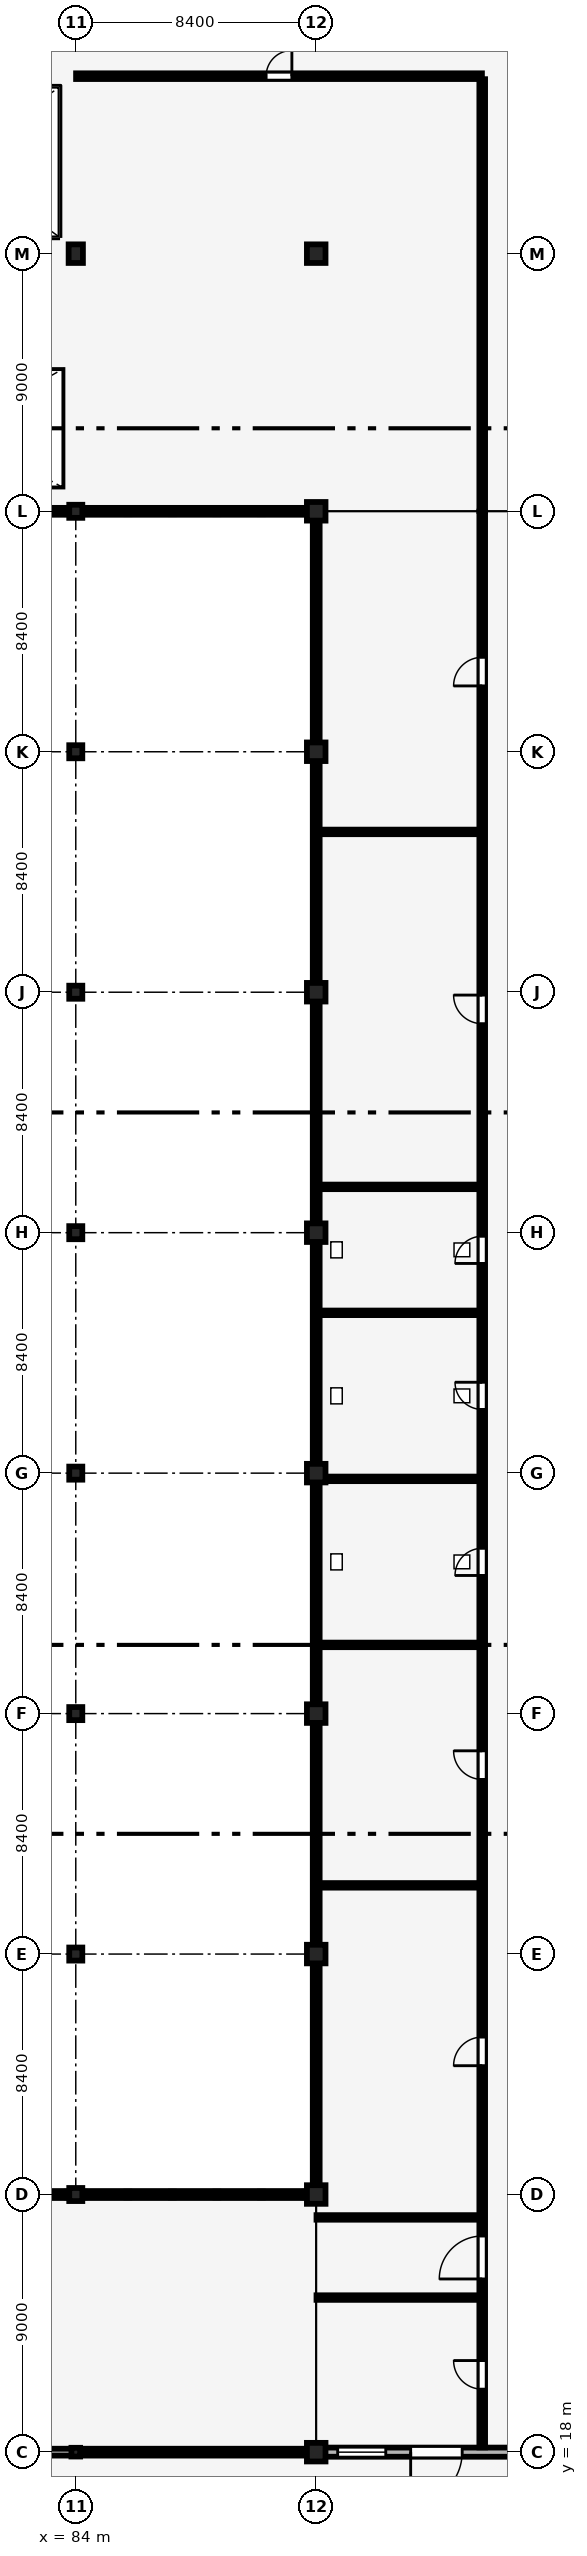
"""IFC4 building model, lengths in metres.
Left out: names, types, materials, properties, quantities, classifications, styles, units other than length and angle.
Written with IfcOpenShell. Run it as: python <this file> out.ifc"""

import sys

from ifc_helpers import new_model, si_unit, direction, frame, frame_2d, origin, origin_2d, place, context, subcontext, project, spatial, rectangle, hollow_rectangle, hollow_circle, extrude, element, fill, save


model = new_model("IFC4")
c1 = context("Model", 3, precision=1e-05, world=origin(), true_north=direction((0.0, 1.0)))
c2 = subcontext(c1, "Body", "Model", "MODEL_VIEW")
j1 = project(units=[si_unit("LENGTHUNIT", "METRE"), si_unit("PLANEANGLEUNIT", "RADIAN")], contexts=[c1])
p1 = place(None, origin())
s1 = spatial("IfcSite", under=j1, at=p1, CompositionType="ELEMENT")
p2 = place(p1, origin())
s2 = spatial("IfcBuilding", under=s1, at=p2, CompositionType="ELEMENT")
p3 = place(p2, frame((0.0, 0.0, 4.8)))
s3 = spatial("IfcBuildingStorey", under=s2, at=p3, CompositionType="ELEMENT", Elevation=4.8)
p4 = place(p3, frame((84.0, 18.0, 0.0), z_axis=(0.0, 0.0, 1.0), x_axis=(1.0, 0.0, 0.0)))
e1 = element("IfcColumn", 1, at=p4, inside=s3, PredefinedType="COLUMN", context=c2, shape_type="SweptSolid", body=[
    extrude(hollow_rectangle(XDim=0.305, YDim=0.305, WallThickness=0.012, InnerFilletRadius=0.012, OuterFilletRadius=0.024, at=origin_2d()), origin(), (0.0, 0.0, 1.0), 4.2),
])
p5 = place(p3, frame((84.0, 94.8, 0.0), z_axis=(0.0, 0.0, 1.0), x_axis=(1.0, 0.0, 0.0)))
e2 = element("IfcColumn", 2, at=p5, inside=s3, PredefinedType="COLUMN", context=c2, shape_type="SweptSolid", body=[
    extrude(rectangle(XDim=0.5, YDim=0.65, at=origin_2d()), origin(), (0.0, 0.0, 1.0), 4.2),
])
for number, where, z_axis, x_axis in (
    (3, (92.4, 18.0, 0.0), (0.0, 0.0, 1.0), (1.0, 0.0, 0.0)),
    (4, (92.4, 27.0, 0.0), (0.0, 0.0, 1.0), (1.0, 0.0, 0.0)),
    (5, (92.4, 35.4, 0.0), (0.0, 0.0, 1.0), (1.0, 0.0, 0.0)),
    (6, (92.4, 43.8, 0.0), (0.0, 0.0, 1.0), (1.0, 0.0, 0.0)),
    (7, (92.4, 52.2, 0.0), (0.0, 0.0, 1.0), (1.0, 0.0, 0.0)),
    (8, (92.4, 60.6, 0.0), (0.0, 0.0, 1.0), (1.0, 0.0, 0.0)),
    (9, (92.4, 69.0, 0.0), (0.0, 0.0, 1.0), (1.0, 0.0, 0.0)),
    (10, (92.4, 77.4, 0.0), (0.0, 0.0, 1.0), (1.0, 0.0, 0.0)),
    (11, (92.4, 85.8, 0.0), (0.0, 0.0, 1.0), (1.0, 0.0, 0.0)),
    (12, (92.4, 94.8, 0.0), (0.0, 0.0, 1.0), (1.0, 0.0, 0.0)),
):
    element("IfcColumn", number, at=place(p3, frame(where, z_axis=z_axis, x_axis=x_axis)), inside=s3, PredefinedType="COLUMN", context=c2, shape_type="SweptSolid", body=[
        extrude(rectangle(XDim=0.65, YDim=0.65, at=origin_2d()), origin(), (0.0, 0.0, 1.0), 4.2),
    ])
for number, where, z_axis, x_axis in (
    (13, (84.0, 27.0, 0.0), (0.0, 0.0, 1.0), (1.0, 0.0, 0.0)),
    (14, (84.0, 35.4, 0.0), (0.0, 0.0, 1.0), (1.0, 0.0, 0.0)),
    (15, (84.0, 43.8, 0.0), (0.0, 0.0, 1.0), (1.0, 0.0, 0.0)),
    (16, (84.0, 52.2, 0.0), (0.0, 0.0, 1.0), (1.0, 0.0, 0.0)),
    (17, (84.0, 60.6, 0.0), (0.0, 0.0, 1.0), (1.0, 0.0, 0.0)),
    (18, (84.0, 69.0, 0.0), (0.0, 0.0, 1.0), (1.0, 0.0, 0.0)),
    (19, (84.0, 77.4, 0.0), (0.0, 0.0, 1.0), (1.0, 0.0, 0.0)),
    (20, (84.0, 85.8, 0.0), (0.0, 0.0, 1.0), (1.0, 0.0, 0.0)),
):
    element("IfcColumn", number, at=place(p3, frame(where, z_axis=z_axis, x_axis=x_axis)), inside=s3, PredefinedType="USERDEFINED", context=c2, shape_type="SweptSolid", body=[
        extrude(hollow_circle(Radius=0.229, WallThickness=0.013, at=origin_2d()), origin(), (0.0, 0.0, 1.0), 4.2),
    ])
p6 = place(p3, frame((92.7, 18.0, 0.0), z_axis=(0.0, 0.0, 1.0), x_axis=(1.0, 0.0, 0.0)))
e21 = element("IfcWall", 21, at=p6, inside=s3, PredefinedType="SOLIDWALL", context=c2, shape_type="SweptSolid", body=[
    extrude(rectangle(XDim=7.8, YDim=0.32, at=frame_2d((3.9, 0.0))), origin(), (0.0, 0.0, 1.0), 3.15),
])
p7 = place(p6, frame((4.8, 0.0, 0.0), z_axis=(0.0, 0.0, 1.0), x_axis=(-1.0, 0.0, 0.0)))
e22 = element("IfcOpeningElement", 22, at=p7, cuts=e21, PredefinedType="OPENING", context=c2, shape_type="SweptSolid", body=[
    extrude(rectangle(XDim=1.8, YDim=2.3, at=frame_2d((0.9, 1.15))), frame((0.0, 0.17, 0.0), z_axis=(0.0, -1.0, 0.0), x_axis=(1.0, 0.0, 0.0)), (0.0, 0.0, 1.0), 0.34),
])
p8 = place(p6, frame((0.45, 0.0, 0.95)))
e23 = element("IfcOpeningElement", 23, at=p8, cuts=e21, PredefinedType="OPENING", context=c2, shape_type="SweptSolid", body=[
    extrude(rectangle(XDim=1.68, YDim=1.8, at=frame_2d((0.84, 0.9))), frame((0.0, 0.17, 0.0), z_axis=(0.0, -1.0, 0.0), x_axis=(1.0, 0.0, 0.0)), (0.0, 0.0, 1.0), 0.34),
])
p9 = place(p3, frame((75.727, 18.0, 0.0), z_axis=(0.0, 0.0, 1.0), x_axis=(1.0, 0.0, 0.0)))
e24 = element("IfcWall", 24, at=p9, inside=s3, PredefinedType="SOLIDWALL", context=c2, shape_type="SweptSolid", body=[
    extrude(rectangle(XDim=8.145, YDim=0.24, at=frame_2d((4.073, 0.0))), origin(), (0.0, 0.0, 1.0), 3.296),
])
p10 = place(p9, frame((4.973, 0.0, 0.0), z_axis=(0.0, 0.0, 1.0), x_axis=(-1.0, 0.0, 0.0)))
e25 = element("IfcOpeningElement", 25, at=p10, cuts=e24, PredefinedType="OPENING", context=c2, shape_type="SweptSolid", body=[
    extrude(rectangle(XDim=1.8, YDim=2.3, at=frame_2d((0.9, 1.15))), frame((0.0, 0.13, 0.0), z_axis=(0.0, -1.0, 0.0), x_axis=(1.0, 0.0, 0.0)), (0.0, 0.0, 1.0), 0.26),
])
p11 = place(p9, frame((0.45, 0.0, 0.95)))
e26 = element("IfcOpeningElement", 26, at=p11, cuts=e24, PredefinedType="OPENING", context=c2, shape_type="SweptSolid", body=[
    extrude(rectangle(XDim=1.68, YDim=1.8, at=frame_2d((0.84, 0.9))), frame((0.0, 0.13, 0.0), z_axis=(0.0, -1.0, 0.0), x_axis=(1.0, 0.0, 0.0)), (0.0, 0.0, 1.0), 0.26),
])
p12 = place(p3, frame((84.127, 18.0, 0.0), z_axis=(0.0, 0.0, 1.0), x_axis=(1.0, 0.0, 0.0)))
e27 = element("IfcWall", 27, at=p12, inside=s3, PredefinedType="SOLIDWALL", context=c2, shape_type="SweptSolid", body=[
    extrude(rectangle(XDim=7.973, YDim=0.24, at=frame_2d((3.986, 0.0))), origin(), (0.0, 0.0, 1.0), 1.1),
])
p13 = place(p3, frame((75.804, 85.8, 0.0), z_axis=(0.0, 0.0, 1.0), x_axis=(1.0, 0.0, 0.0)))
e28 = element("IfcWall", 28, at=p13, inside=s3, PredefinedType="SOLIDWALL", context=c2, shape_type="SweptSolid", body=[
    extrude(rectangle(XDim=7.993, YDim=0.24, at=frame_2d((3.996, 0.0))), origin(), (0.0, 0.0, 1.0), 1.1),
])
p14 = place(p3, frame((84.204, 85.8, 0.0), z_axis=(0.0, 0.0, 1.0), x_axis=(1.0, 0.0, 0.0)))
e29 = element("IfcWall", 29, at=p14, inside=s3, PredefinedType="SOLIDWALL", context=c2, shape_type="SweptSolid", body=[
    extrude(rectangle(XDim=7.896, YDim=0.24, at=frame_2d((3.948, 0.0))), origin(), (0.0, 0.0, 1.0), 1.1),
])
for number, where, z_axis, x_axis in (
    (30, (92.4, 27.3, 0.0), (0.0, 0.0, 1.0), (0.0, 1.0, 0.0)),
    (31, (92.4, 35.7, 0.0), (0.0, 0.0, 1.0), (0.0, 1.0, 0.0)),
):
    element("IfcWall", number, at=place(p3, frame(where, z_axis=z_axis, x_axis=x_axis)), inside=s3, PredefinedType="SOLIDWALL", context=c2, shape_type="SweptSolid", body=[
        extrude(rectangle(XDim=7.8, YDim=0.24, at=frame_2d((3.9, 0.0))), origin(), (0.0, 0.0, 1.0), 1.15),
    ])
p15 = place(p3, frame((92.4, 44.1, 0.0), z_axis=(0.0, 0.0, 1.0), x_axis=(0.0, 1.0, 0.0)))
e32 = element("IfcWall", 32, at=p15, inside=s3, PredefinedType="SOLIDWALL", context=c2, shape_type="SweptSolid", body=[
    extrude(rectangle(XDim=7.8, YDim=0.24, at=frame_2d((3.9, 0.0))), origin(), (0.0, 0.0, 1.0), 1.15),
])
for number, where, z_axis, x_axis in (
    (33, (92.4, 52.5, 0.0), (0.0, 0.0, 1.0), (0.0, 1.0, 0.0)),
    (34, (92.4, 60.9, 0.0), (0.0, 0.0, 1.0), (0.0, 1.0, 0.0)),
    (35, (92.4, 69.3, 0.0), (0.0, 0.0, 1.0), (0.0, 1.0, 0.0)),
    (36, (92.4, 77.7, 0.0), (0.0, 0.0, 1.0), (0.0, 1.0, 0.0)),
):
    element("IfcWall", number, at=place(p3, frame(where, z_axis=z_axis, x_axis=x_axis)), inside=s3, PredefinedType="SOLIDWALL", context=c2, shape_type="SweptSolid", body=[
        extrude(rectangle(XDim=7.8, YDim=0.24, at=frame_2d((3.9, 0.0))), origin(), (0.0, 0.0, 1.0), 1.15),
    ])
p16 = place(p3, frame((75.804, 27.0, 0.0), z_axis=(0.0, 0.0, 1.0), x_axis=(1.0, 0.0, 0.0)))
e37 = element("IfcWall", 37, at=p16, inside=s3, PredefinedType="SOLIDWALL", context=c2, shape_type="SweptSolid", body=[
    extrude(rectangle(XDim=7.993, YDim=0.24, at=frame_2d((3.996, 0.0))), origin(), (0.0, 0.0, 1.0), 1.1),
])
p17 = place(p3, frame((84.204, 27.0, 0.0), z_axis=(0.0, 0.0, 1.0), x_axis=(1.0, 0.0, 0.0)))
e38 = element("IfcWall", 38, at=p17, inside=s3, PredefinedType="SOLIDWALL", context=c2, shape_type="SweptSolid", body=[
    extrude(rectangle(XDim=7.896, YDim=0.24, at=frame_2d((3.948, 0.0))), origin(), (0.0, 0.0, 1.0), 1.1),
])
p18 = place(p3, frame((84.01, 101.0, 0.0), z_axis=(0.0, 0.0, 1.0), x_axis=(1.0, 0.0, 0.0)))
e39 = element("IfcWall", 39, at=p18, inside=s3, PredefinedType="PARTITIONING", context=c2, shape_type="SweptSolid", body=[
    extrude(rectangle(XDim=14.18, YDim=0.2, at=frame_2d((7.09, 0.0))), origin(), (0.0, 0.0, 1.0), 3.44),
])
p19 = place(p18, frame((6.64, 0.0, 0.0)))
e40 = element("IfcOpeningElement", 40, at=p19, cuts=e39, PredefinedType="OPENING", context=c2, shape_type="SweptSolid", body=[
    extrude(rectangle(XDim=0.9, YDim=2.1, at=frame_2d((0.45, 1.05))), frame((0.0, 0.11, 0.0), z_axis=(0.0, -1.0, 0.0), x_axis=(1.0, 0.0, 0.0)), (0.0, 0.0, 1.0), 0.22),
])
p20 = place(p3, frame((98.2, 85.81, 0.0), z_axis=(0.0, 0.0, 1.0), x_axis=(0.0, 1.0, 0.0)))
e41 = element("IfcWall", 41, at=p20, inside=s3, PredefinedType="PARTITIONING", context=c2, shape_type="SweptSolid", body=[
    extrude(rectangle(XDim=15.085, YDim=0.2, at=frame_2d((7.542, 0.0))), origin(), (0.0, 0.0, 1.0), 3.9),
])
for number, where, z_axis, x_axis in (
    (42, (92.41, 23.4, 0.0), (0.0, 0.0, 1.0), (1.0, 0.0, 0.0)),
    (43, (92.41, 26.2, 0.0), (0.0, 0.0, 1.0), (1.0, 0.0, 0.0)),
):
    element("IfcWall", number, at=place(p3, frame(where, z_axis=z_axis, x_axis=x_axis)), inside=s3, PredefinedType="PARTITIONING", context=c2, shape_type="SweptSolid", body=[
        extrude(rectangle(XDim=5.685, YDim=0.16, at=frame_2d((2.843, 0.0))), origin(), (0.0, 0.0, 1.0), 3.9),
    ])
p21 = place(p3, frame((92.525, 37.8, 0.0), z_axis=(0.0, 0.0, 1.0), x_axis=(1.0, 0.0, 0.0)))
e44 = element("IfcWall", 44, at=p21, inside=s3, PredefinedType="PARTITIONING", context=c2, shape_type="SweptSolid", body=[
    extrude(rectangle(XDim=5.57, YDim=0.16, at=frame_2d((2.785, 0.0))), origin(), (0.0, 0.0, 1.0), 3.9),
])
p22 = place(p3, frame((92.525, 46.2, 0.0), z_axis=(0.0, 0.0, 1.0), x_axis=(1.0, 0.0, 0.0)))
e45 = element("IfcWall", 45, at=p22, inside=s3, PredefinedType="PARTITIONING", context=c2, shape_type="SweptSolid", body=[
    extrude(rectangle(XDim=5.57, YDim=0.16, at=frame_2d((2.785, 0.0))), origin(), (0.0, 0.0, 1.0), 3.42),
])
p23 = place(p3, frame((92.525, 52.0, 0.0), z_axis=(0.0, 0.0, 1.0), x_axis=(1.0, 0.0, 0.0)))
e46 = element("IfcWall", 46, at=p23, inside=s3, PredefinedType="PARTITIONING", context=c2, shape_type="SweptSolid", body=[
    extrude(rectangle(XDim=5.57, YDim=0.16, at=frame_2d((2.785, 0.0))), origin(), (0.0, 0.0, 1.0), 3.1),
])
p24 = place(p3, frame((92.525, 57.8, 0.0), z_axis=(0.0, 0.0, 1.0), x_axis=(1.0, 0.0, 0.0)))
e47 = element("IfcWall", 47, at=p24, inside=s3, PredefinedType="PARTITIONING", context=c2, shape_type="SweptSolid", body=[
    extrude(rectangle(XDim=5.57, YDim=0.16, at=frame_2d((2.785, 0.0))), origin(), (0.0, 0.0, 1.0), 3.42),
])
p25 = place(p3, frame((92.525, 62.2, 0.0), z_axis=(0.0, 0.0, 1.0), x_axis=(1.0, 0.0, 0.0)))
e48 = element("IfcWall", 48, at=p25, inside=s3, PredefinedType="PARTITIONING", context=c2, shape_type="SweptSolid", body=[
    extrude(rectangle(XDim=5.57, YDim=0.16, at=frame_2d((2.785, 0.0))), origin(), (0.0, 0.0, 1.0), 3.9),
])
p26 = place(p3, frame((92.525, 74.6, 0.0), z_axis=(0.0, 0.0, 1.0), x_axis=(1.0, 0.0, 0.0)))
e49 = element("IfcWall", 49, at=p26, inside=s3, PredefinedType="PARTITIONING", context=c2, shape_type="SweptSolid", body=[
    extrude(rectangle(XDim=5.57, YDim=0.16, at=frame_2d((2.785, 0.0))), origin(), (0.0, 0.0, 1.0), 3.42),
])
p27 = place(p3, frame((98.2, 18.165, 0.0), z_axis=(0.0, 0.0, 1.0), x_axis=(0.0, 1.0, 0.0)))
e50 = element("IfcWall", 50, at=p27, inside=s3, PredefinedType="PARTITIONING", context=c2, shape_type="SweptSolid", body=[
    extrude(rectangle(XDim=67.625, YDim=0.2, at=frame_2d((33.812, 0.0))), origin(), (0.0, 0.0, 1.0), 3.9),
])
p28 = place(p27, frame((2.035, 0.0, 0.0)))
e51 = element("IfcOpeningElement", 51, at=p28, cuts=e50, PredefinedType="OPENING", context=c2, shape_type="SweptSolid", body=[
    extrude(rectangle(XDim=1.0, YDim=2.15, at=frame_2d((0.5, 1.075))), frame((0.0, 0.11, 0.0), z_axis=(0.0, -1.0, 0.0), x_axis=(1.0, 0.0, 0.0)), (0.0, 0.0, 1.0), 0.22),
])
p29 = place(p27, frame((5.885, 0.0, 0.0)))
e52 = element("IfcOpeningElement", 52, at=p29, cuts=e50, PredefinedType="OPENING", context=c2, shape_type="SweptSolid", body=[
    extrude(rectangle(XDim=1.5, YDim=2.2, at=frame_2d((0.75, 1.1))), frame((0.0, 0.11, 0.0), z_axis=(0.0, -1.0, 0.0), x_axis=(1.0, 0.0, 0.0)), (0.0, 0.0, 1.0), 0.22),
])
p30 = place(p27, frame((13.335, 0.0, 0.0)))
e53 = element("IfcOpeningElement", 53, at=p30, cuts=e50, PredefinedType="OPENING", context=c2, shape_type="SweptSolid", body=[
    extrude(rectangle(XDim=1.0, YDim=2.15, at=frame_2d((0.5, 1.075))), frame((0.0, 0.11, 0.0), z_axis=(0.0, -1.0, 0.0), x_axis=(1.0, 0.0, 0.0)), (0.0, 0.0, 1.0), 0.22),
])
p31 = place(p27, frame((23.335, 0.0, 0.0)))
e54 = element("IfcOpeningElement", 54, at=p31, cuts=e50, PredefinedType="OPENING", context=c2, shape_type="SweptSolid", body=[
    extrude(rectangle(XDim=1.0, YDim=2.15, at=frame_2d((0.5, 1.075))), frame((0.0, 0.11, 0.0), z_axis=(0.0, -1.0, 0.0), x_axis=(1.0, 0.0, 0.0)), (0.0, 0.0, 1.0), 0.22),
])
p32 = place(p27, frame((30.46, 0.0, 0.0)))
e55 = element("IfcOpeningElement", 55, at=p32, cuts=e50, PredefinedType="OPENING", context=c2, shape_type="SweptSolid", body=[
    extrude(rectangle(XDim=0.95, YDim=2.2, at=frame_2d((0.475, 1.1))), frame((0.0, 0.11, 0.0), z_axis=(0.0, -1.0, 0.0), x_axis=(1.0, 0.0, 0.0)), (0.0, 0.0, 1.0), 0.22),
])
p33 = place(p27, frame((36.26, 0.0, 0.0)))
e56 = element("IfcOpeningElement", 56, at=p33, cuts=e50, PredefinedType="OPENING", context=c2, shape_type="SweptSolid", body=[
    extrude(rectangle(XDim=0.95, YDim=2.2, at=frame_2d((0.475, 1.1))), frame((0.0, 0.11, 0.0), z_axis=(0.0, -1.0, 0.0), x_axis=(1.0, 0.0, 0.0)), (0.0, 0.0, 1.0), 0.22),
])
p34 = place(p27, frame((41.36, 0.0, 0.0)))
e57 = element("IfcOpeningElement", 57, at=p34, cuts=e50, PredefinedType="OPENING", context=c2, shape_type="SweptSolid", body=[
    extrude(rectangle(XDim=0.95, YDim=2.1, at=frame_2d((0.475, 1.05))), frame((0.0, 0.11, 0.0), z_axis=(0.0, -1.0, 0.0), x_axis=(1.0, 0.0, 0.0)), (0.0, 0.0, 1.0), 0.22),
])
p35 = place(p27, frame((49.735, 0.0, 0.0)))
e58 = element("IfcOpeningElement", 58, at=p35, cuts=e50, PredefinedType="OPENING", context=c2, shape_type="SweptSolid", body=[
    extrude(rectangle(XDim=1.0, YDim=2.15, at=frame_2d((0.5, 1.075))), frame((0.0, 0.11, 0.0), z_axis=(0.0, -1.0, 0.0), x_axis=(1.0, 0.0, 0.0)), (0.0, 0.0, 1.0), 0.22),
])
p36 = place(p27, frame((61.535, 0.0, 0.0)))
e59 = element("IfcOpeningElement", 59, at=p36, cuts=e50, PredefinedType="OPENING", context=c2, shape_type="SweptSolid", body=[
    extrude(rectangle(XDim=1.0, YDim=2.15, at=frame_2d((0.5, 1.075))), frame((0.0, 0.11, 0.0), z_axis=(0.0, -1.0, 0.0), x_axis=(1.0, 0.0, 0.0)), (0.0, 0.0, 1.0), 0.22),
])
p37 = place(p7, origin())
e60 = element("IfcDoor", 60, at=p37, inside=s3, OperationType="DOUBLE_DOOR_SINGLE_SWING", PredefinedType="DOOR", context=c2, shape_type="SweptSolid", body=[
    extrude(rectangle(XDim=1.8, YDim=2.3, at=frame_2d((0.9, 1.15))), frame((0.0, 0.025, 0.0), z_axis=(0.0, -1.0, 0.0), x_axis=(1.0, 0.0, 0.0)), (0.0, 0.0, 1.0), 0.05),
])
fill(e22, e60)
p38 = place(p8, origin())
e61 = element("IfcWindow", 61, at=p38, inside=s3, PartitioningType="SINGLE_PANEL", PredefinedType="WINDOW", context=c2, shape_type="SweptSolid", body=[
    extrude(rectangle(XDim=1.68, YDim=1.8, at=frame_2d((0.84, 0.9))), frame((0.0, 0.03, 0.0), z_axis=(0.0, -1.0, 0.0), x_axis=(1.0, 0.0, 0.0)), (0.0, 0.0, 1.0), 0.06),
])
fill(e23, e61)
p39 = place(p19, origin())
e62 = element("IfcDoor", 62, at=p39, inside=s3, OperationType="SINGLE_SWING_RIGHT", PredefinedType="DOOR", context=c2, shape_type="SweptSolid", body=[
    extrude(rectangle(XDim=0.9, YDim=2.1, at=frame_2d((0.45, 1.05))), frame((0.0, 0.025, 0.0), z_axis=(0.0, -1.0, 0.0), x_axis=(1.0, 0.0, 0.0)), (0.0, 0.0, 1.0), 0.05),
])
fill(e40, e62)
p40 = place(p28, origin())
e63 = element("IfcDoor", 63, at=p40, inside=s3, OperationType="SINGLE_SWING_RIGHT", PredefinedType="DOOR", context=c2, shape_type="SweptSolid", body=[
    extrude(rectangle(XDim=1.0, YDim=2.15, at=frame_2d((0.5, 1.075))), frame((0.0, 0.025, 0.0), z_axis=(0.0, -1.0, 0.0), x_axis=(1.0, 0.0, 0.0)), (0.0, 0.0, 1.0), 0.05),
])
fill(e51, e63)
p41 = place(p29, origin())
e64 = element("IfcDoor", 64, at=p41, inside=s3, OperationType="DOUBLE_DOOR_SINGLE_SWING", PredefinedType="DOOR", context=c2, shape_type="SweptSolid", body=[
    extrude(rectangle(XDim=1.5, YDim=2.2, at=frame_2d((0.75, 1.1))), frame((0.0, 0.025, 0.0), z_axis=(0.0, -1.0, 0.0), x_axis=(1.0, 0.0, 0.0)), (0.0, 0.0, 1.0), 0.05),
])
fill(e52, e64)
p42 = place(p30, origin())
e65 = element("IfcDoor", 65, at=p42, inside=s3, OperationType="SINGLE_SWING_LEFT", PredefinedType="DOOR", context=c2, shape_type="SweptSolid", body=[
    extrude(rectangle(XDim=1.0, YDim=2.15, at=frame_2d((0.5, 1.075))), frame((0.0, 0.025, 0.0), z_axis=(0.0, -1.0, 0.0), x_axis=(1.0, 0.0, 0.0)), (0.0, 0.0, 1.0), 0.05),
])
fill(e53, e65)
p43 = place(p31, origin())
e66 = element("IfcDoor", 66, at=p43, inside=s3, OperationType="SINGLE_SWING_RIGHT", PredefinedType="DOOR", context=c2, shape_type="SweptSolid", body=[
    extrude(rectangle(XDim=1.0, YDim=2.15, at=frame_2d((0.5, 1.075))), frame((0.0, 0.025, 0.0), z_axis=(0.0, -1.0, 0.0), x_axis=(1.0, 0.0, 0.0)), (0.0, 0.0, 1.0), 0.05),
])
fill(e54, e66)
p44 = place(p32, origin())
e67 = element("IfcDoor", 67, at=p44, inside=s3, OperationType="SINGLE_SWING_LEFT", PredefinedType="DOOR", context=c2, shape_type="SweptSolid", body=[
    extrude(rectangle(XDim=0.95, YDim=2.2, at=frame_2d((0.475, 1.1))), frame((0.0, 0.025, 0.0), z_axis=(0.0, -1.0, 0.0), x_axis=(1.0, 0.0, 0.0)), (0.0, 0.0, 1.0), 0.05),
])
fill(e55, e67)
p45 = place(p33, origin())
e68 = element("IfcDoor", 68, at=p45, inside=s3, OperationType="SINGLE_SWING_RIGHT", PredefinedType="DOOR", context=c2, shape_type="SweptSolid", body=[
    extrude(rectangle(XDim=0.95, YDim=2.2, at=frame_2d((0.475, 1.1))), frame((0.0, 0.025, 0.0), z_axis=(0.0, -1.0, 0.0), x_axis=(1.0, 0.0, 0.0)), (0.0, 0.0, 1.0), 0.05),
])
fill(e56, e68)
p46 = place(p34, origin())
e69 = element("IfcDoor", 69, at=p46, inside=s3, OperationType="SINGLE_SWING_LEFT", PredefinedType="DOOR", context=c2, shape_type="SweptSolid", body=[
    extrude(rectangle(XDim=0.95, YDim=2.1, at=frame_2d((0.475, 1.05))), frame((0.0, 0.025, 0.0), z_axis=(0.0, -1.0, 0.0), x_axis=(1.0, 0.0, 0.0)), (0.0, 0.0, 1.0), 0.05),
])
fill(e57, e69)
p47 = place(p35, origin())
e70 = element("IfcDoor", 70, at=p47, inside=s3, OperationType="SINGLE_SWING_RIGHT", PredefinedType="DOOR", context=c2, shape_type="SweptSolid", body=[
    extrude(rectangle(XDim=1.0, YDim=2.15, at=frame_2d((0.5, 1.075))), frame((0.0, 0.025, 0.0), z_axis=(0.0, -1.0, 0.0), x_axis=(1.0, 0.0, 0.0)), (0.0, 0.0, 1.0), 0.05),
])
fill(e58, e70)
p48 = place(p36, origin())
e71 = element("IfcDoor", 71, at=p48, inside=s3, OperationType="SINGLE_SWING_LEFT", PredefinedType="DOOR", context=c2, shape_type="SweptSolid", body=[
    extrude(rectangle(XDim=1.0, YDim=2.15, at=frame_2d((0.5, 1.075))), frame((0.0, 0.025, 0.0), z_axis=(0.0, -1.0, 0.0), x_axis=(1.0, 0.0, 0.0)), (0.0, 0.0, 1.0), 0.05),
])
fill(e59, e71)
save(model, sys.argv[1])
